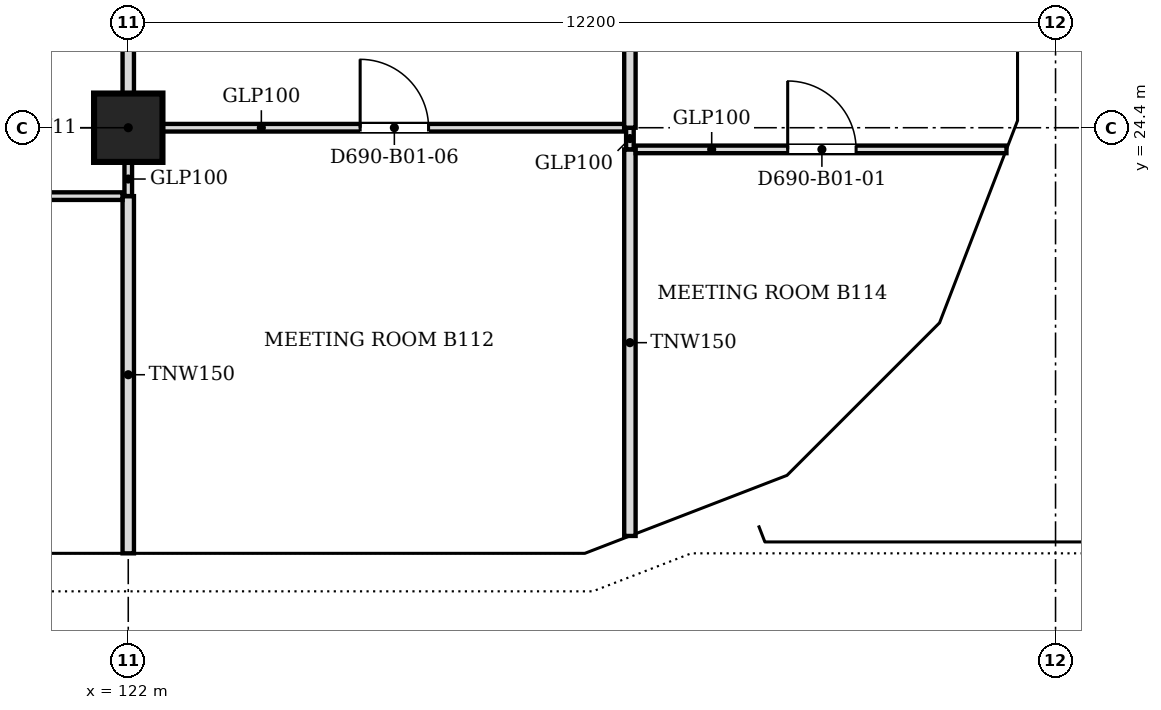
"""IFC4 building model, lengths in metres.
Left out: names, types, materials, properties, quantities, classifications, styles, units other than length and angle.
Written with IfcOpenShell. Run it as: python <this file> out.ifc"""

import sys

from ifc_helpers import new_model, si_unit, direction, frame, frame_2d, origin, origin_2d, place, context, subcontext, project, spatial, polyline, rectangle, outline, extrude, faceted_brep, source, transform, mapped, element, fill, save


model = new_model("IFC4")
c1 = context("Model", 3, precision=1e-05, world=origin(), true_north=direction((0.0, 1.0)))
c2 = subcontext(c1, "Body", "Model", "MODEL_VIEW")
j1 = project(units=[si_unit("LENGTHUNIT", "METRE"), si_unit("PLANEANGLEUNIT", "RADIAN")], contexts=[c1])
p1 = place(None, origin())
s1 = spatial("IfcSite", under=j1, at=p1, CompositionType="ELEMENT")
p2 = place(p1, origin())
s2 = spatial("IfcBuilding", under=s1, at=p2, CompositionType="ELEMENT")
p3 = place(p2, frame((0.0, 0.0, 16.8)))
s3 = spatial("IfcBuildingStorey", under=s2, at=p3, CompositionType="ELEMENT", Elevation=16.8)
p4 = place(p3, frame((122.0, 24.4, 0.0), z_axis=(0.0, 0.0, 1.0), x_axis=(1.0, 0.0, 0.0)))
e1 = element("IfcColumn", 1, at=p4, inside=s3, PredefinedType="COLUMN", context=c2, shape_type="SweptSolid", body=[
    extrude(rectangle(XDim=0.9, YDim=0.9, at=origin_2d()), origin(), (0.0, 0.0, 1.0), 4.3),
])
m1 = source(origin(), c2, "Body", "SweptSolid", [
    extrude(outline(polyline([(6.1, 0.0), (3.05, 4.5), (0.0, 0.0), (6.1, 0.0)])), frame((0.0, 0.25, 0.0), z_axis=(0.0, -1.0, 0.0), x_axis=(1.0, 0.0, 0.0)), (0.0, 0.0, 1.0), 0.5),
])
p5 = place(p3, frame((118.95, 18.55, 0.0), z_axis=(0.0, 0.0, 1.0), x_axis=(1.0, 0.0, 0.0)))
e2 = element("IfcWall", 2, at=p5, inside=s3, PredefinedType="SOLIDWALL", context=c2, shape_type="MappedRepresentation", body=[
    mapped(m1, transform((0.0, 0.0, 0.0), scale=1.0)),
])
m2 = source(origin(), c2, "Body", "SweptSolid", [
    extrude(outline(polyline([(5.629, 0.25), (3.05, 4.054), (0.471, 0.25), (5.629, 0.25)])), frame((0.0, 0.26, 0.0), z_axis=(0.0, -1.0, 0.0), x_axis=(1.0, 0.0, 0.0)), (0.0, 0.0, 1.0), 0.52),
])
p6 = place(p5, origin())
e3 = element("IfcOpeningElement", 3, at=p6, cuts=e2, PredefinedType="OPENING", context=c2, shape_type="MappedRepresentation", body=[
    mapped(m2, transform((0.0, 0.0, 0.0), scale=1.0)),
])
m3 = source(origin(), c2, "Body", "Brep", [
    faceted_brep([(3.05, -0.25, 4.429), (3.003, -0.25, 4.5), (0.0, -0.25, 0.0), (3.05, -0.25, 0.0), (0.0, 0.25, 0.0), (2.957, 0.25, 4.43), (2.957, 0.25, 0.0), (3.003, 0.0, 4.5)], [[[0, 1, 2, 3]], [[4, 5, 6]], [[7, 1, 0]], [[5, 4, 2, 1, 7]], [[4, 6, 3, 2]], [[3, 6, 5, 7, 0]]]),
])
p7 = place(p3, frame((125.05, 18.55, 0.0), z_axis=(0.0, 0.0, 1.0), x_axis=(1.0, 0.0, 0.0)))
e4 = element("IfcWall", 4, at=p7, inside=s3, PredefinedType="SOLIDWALL", context=c2, shape_type="MappedRepresentation", body=[
    mapped(m3, transform((0.0, 0.0, 0.0), scale=1.0)),
])
m4 = source(origin(), c2, "Body", "SweptSolid", [
    extrude(outline(polyline([(2.803, 3.75), (0.468, 0.25), (2.803, 0.25), (2.803, 3.75)])), frame((0.0, 0.26, 0.0), z_axis=(0.0, -1.0, 0.0), x_axis=(1.0, 0.0, 0.0)), (0.0, 0.0, 1.0), 0.52),
])
p8 = place(p7, origin())
e5 = element("IfcOpeningElement", 5, at=p8, cuts=e4, PredefinedType="OPENING", context=c2, shape_type="MappedRepresentation", body=[
    mapped(m4, transform((0.0, 0.0, 0.0), scale=1.0)),
])
m5 = source(origin(), c2, "Body", "Brep", [
    faceted_brep([(2.997, -0.25, 0.0), (0.047, -0.25, 4.5), (0.0, -0.25, 4.43), (0.0, -0.25, 0.0), (0.093, 0.25, 4.429), (2.944, 0.25, 0.081), (2.944, 0.25, 0.0), (0.093, 0.25, 0.0), (0.047, 0.0, 4.5), (2.997, 0.0, 0.0)], [[[0, 1, 2, 3]], [[4, 5, 6, 7]], [[5, 4, 8, 1, 0, 9]], [[2, 1, 8]], [[7, 6, 9, 0, 3]], [[7, 3, 2, 8, 4]], [[9, 6, 5]]]),
])
p9 = place(p3, frame((128.01, 18.533, 0.0), z_axis=(0.0, 0.0, 1.0), x_axis=(0.932990326376, 0.359901446078, 0.0)))
e6 = element("IfcWall", 6, at=p9, inside=s3, PredefinedType="SOLIDWALL", context=c2, shape_type="MappedRepresentation", body=[
    mapped(m5, transform((0.0, 0.0, 0.0), scale=1.0)),
])
m6 = source(origin(), c2, "Body", "SweptSolid", [
    extrude(outline(polyline([(2.534, 0.25), (0.247, 3.739), (0.247, 0.25), (2.534, 0.25)])), frame((0.0, 0.26, 0.0), z_axis=(0.0, -1.0, 0.0), x_axis=(1.0, 0.0, 0.0)), (0.0, 0.0, 1.0), 0.52),
])
p10 = place(p9, origin())
e7 = element("IfcOpeningElement", 7, at=p10, cuts=e6, PredefinedType="OPENING", context=c2, shape_type="MappedRepresentation", body=[
    mapped(m6, transform((0.0, 0.0, 0.0), scale=1.0)),
])
m7 = source(origin(), c2, "Body", "Brep", [
    faceted_brep([(2.997, -0.25, 4.419), (2.944, -0.25, 4.5), (0.0, -0.25, 0.0), (2.997, -0.25, 0.0), (0.053, 0.25, 0.081), (2.891, 0.25, 4.419), (2.891, 0.25, 0.0), (0.053, 0.25, 0.0), (2.944, 0.0, 4.5), (0.0, 0.0, 0.0)], [[[0, 1, 2, 3]], [[4, 5, 6, 7]], [[8, 1, 0]], [[5, 4, 9, 2, 1, 8]], [[7, 6, 3, 2, 9]], [[7, 9, 4]], [[3, 6, 5, 8, 0]]]),
])
p11 = place(p3, frame((130.806, 19.612, 0.0), z_axis=(0.0, 0.0, 1.0), x_axis=(0.707106781187, 0.707106781187, 0.0)))
e8 = element("IfcWall", 8, at=p11, inside=s3, PredefinedType="SOLIDWALL", context=c2, shape_type="MappedRepresentation", body=[
    mapped(m7, transform((0.0, 0.0, 0.0), scale=1.0)),
])
m8 = source(origin(), c2, "Body", "SweptSolid", [
    extrude(outline(polyline([(2.744, 3.738), (0.462, 0.25), (2.744, 0.25), (2.744, 3.738)])), frame((0.0, 0.26, 0.0), z_axis=(0.0, -1.0, 0.0), x_axis=(1.0, 0.0, 0.0)), (0.0, 0.0, 1.0), 0.52),
])
p12 = place(p11, origin())
e9 = element("IfcOpeningElement", 9, at=p12, cuts=e8, PredefinedType="OPENING", context=c2, shape_type="MappedRepresentation", body=[
    mapped(m8, transform((0.0, 0.0, 0.0), scale=1.0)),
])
m9 = source(origin(), c2, "Body", "Brep", [
    faceted_brep([(3.003, -0.25, 0.0), (0.053, -0.25, 4.5), (0.0, -0.25, 4.419), (0.0, -0.25, 0.0), (0.106, 0.25, 4.419), (2.957, 0.25, 0.071), (2.957, 0.25, 0.0), (0.106, 0.25, 0.0), (0.053, 0.0, 4.5), (3.003, 0.0, 0.0)], [[[0, 1, 2, 3]], [[4, 5, 6, 7]], [[5, 4, 8, 1, 0, 9]], [[2, 1, 8]], [[7, 6, 9, 0, 3]], [[7, 3, 2, 8, 4]], [[9, 6, 5]]]),
])
p13 = place(p3, frame((132.869, 21.644, 0.0), z_axis=(0.0, 0.0, 1.0), x_axis=(0.359855894603, 0.933007896601, 0.0)))
e10 = element("IfcWall", 10, at=p13, inside=s3, PredefinedType="SOLIDWALL", context=c2, shape_type="MappedRepresentation", body=[
    mapped(m9, transform((0.0, 0.0, 0.0), scale=1.0)),
])
m10 = source(origin(), c2, "Body", "SweptSolid", [
    extrude(outline(polyline([(2.541, 0.25), (0.253, 3.739), (0.253, 0.25), (2.541, 0.25)])), frame((0.0, 0.26, 0.0), z_axis=(0.0, -1.0, 0.0), x_axis=(1.0, 0.0, 0.0)), (0.0, 0.0, 1.0), 0.52),
])
p14 = place(p13, origin())
e11 = element("IfcOpeningElement", 11, at=p14, cuts=e10, PredefinedType="OPENING", context=c2, shape_type="MappedRepresentation", body=[
    mapped(m10, transform((0.0, 0.0, 0.0), scale=1.0)),
])
m11 = source(origin(), c2, "Body", "Brep", [
    faceted_brep([(6.053, -0.25, 0.0), (3.003, -0.25, 4.5), (0.0, -0.25, 0.0), (0.047, 0.25, 0.07), (3.003, 0.25, 4.5), (6.053, 0.25, 0.0), (0.047, 0.25, 0.0), (0.0, 0.0, 0.0)], [[[0, 1, 2]], [[3, 4, 5, 6]], [[5, 4, 1, 0]], [[4, 3, 7, 2, 1]], [[6, 5, 0, 2, 7]], [[6, 7, 3]]]),
])
p15 = place(p3, frame((133.95, 24.447, 0.0), z_axis=(0.0, 0.0, 1.0), x_axis=(0.0, 1.0, 0.0)))
e12 = element("IfcWall", 12, at=p15, inside=s3, PredefinedType="SOLIDWALL", context=c2, shape_type="MappedRepresentation", body=[
    mapped(m11, transform((0.0, 0.0, 0.0), scale=1.0)),
])
m12 = source(origin(), c2, "Body", "SweptSolid", [
    extrude(outline(polyline([(5.582, 0.25), (3.005, 4.052), (0.468, 0.25), (5.582, 0.25)])), frame((0.0, 0.26, 0.0), z_axis=(0.0, -1.0, 0.0), x_axis=(1.0, 0.0, 0.0)), (0.0, 0.0, 1.0), 0.52),
])
p16 = place(p15, origin())
e13 = element("IfcOpeningElement", 13, at=p16, cuts=e12, PredefinedType="OPENING", context=c2, shape_type="MappedRepresentation", body=[
    mapped(m12, transform((0.0, 0.0, 0.0), scale=1.0)),
])
p17 = place(p2, frame((0.0, 0.0, 21.3)))
s4 = spatial("IfcBuildingStorey", under=s2, at=p17, CompositionType="ELEMENT", Elevation=21.3)
m13 = source(origin(), c2, "Body", "SweptSolid", [
    extrude(outline(polyline([(3.05, 0.0), (6.1, 4.5), (3.05, 9.0), (0.0, 4.5), (3.05, 0.0)])), frame((0.0, 0.25, 0.0), z_axis=(0.0, -1.0, 0.0), x_axis=(1.0, 0.0, 0.0)), (0.0, 0.0, 1.0), 0.5),
])
p18 = place(p17, frame((115.9, 18.55, -4.5), z_axis=(0.0, 0.0, 1.0), x_axis=(1.0, 0.0, 0.0)))
e14 = element("IfcWall", 14, at=p18, inside=s4, PredefinedType="SOLIDWALL", context=c2, shape_type="MappedRepresentation", body=[
    mapped(m13, transform((0.0, 0.0, 0.0), scale=1.0)),
])
m14 = source(origin(), c2, "Body", "SweptSolid", [
    extrude(outline(polyline([(3.05, 0.446), (5.798, 4.5), (3.05, 8.554), (0.302, 4.5), (3.05, 0.446)])), frame((0.0, 0.26, 0.0), z_axis=(0.0, -1.0, 0.0), x_axis=(1.0, 0.0, 0.0)), (0.0, 0.0, 1.0), 0.52),
])
p19 = place(p18, origin())
e15 = element("IfcOpeningElement", 15, at=p19, cuts=e14, PredefinedType="OPENING", context=c2, shape_type="MappedRepresentation", body=[
    mapped(m14, transform((0.0, 0.0, 0.0), scale=1.0)),
])
m15 = source(origin(), c2, "Body", "Brep", [
    faceted_brep([(3.05, -0.25, 0.0), (6.053, -0.25, 4.5), (3.05, -0.25, 9.0), (0.0, -0.25, 4.5), (0.0, 0.25, 4.5), (3.05, 0.25, 9.0), (6.007, 0.25, 4.57), (6.007, 0.25, 4.43), (3.05, 0.25, 0.0), (6.053, 0.0, 4.5)], [[[0, 1, 2, 3]], [[4, 5, 6, 7, 8]], [[8, 7, 9, 1, 0]], [[6, 5, 2, 1, 9]], [[5, 4, 3, 2]], [[4, 8, 0, 3]], [[9, 7, 6]]]),
])
p20 = place(p17, frame((122.0, 18.55, -4.5), z_axis=(0.0, 0.0, 1.0), x_axis=(1.0, 0.0, 0.0)))
e16 = element("IfcWall", 16, at=p20, inside=s4, PredefinedType="SOLIDWALL", context=c2, shape_type="MappedRepresentation", body=[
    mapped(m15, transform((0.0, 0.0, 0.0), scale=1.0)),
])
m16 = source(origin(), c2, "Body", "SweptSolid", [
    extrude(outline(polyline([(3.048, 0.448), (5.753, 4.5), (3.048, 8.552), (0.302, 4.5), (3.048, 0.448)])), frame((0.0, 0.26, 0.0), z_axis=(0.0, -1.0, 0.0), x_axis=(1.0, 0.0, 0.0)), (0.0, 0.0, 1.0), 0.52),
])
p21 = place(p20, origin())
e17 = element("IfcOpeningElement", 17, at=p21, cuts=e16, PredefinedType="OPENING", context=c2, shape_type="MappedRepresentation", body=[
    mapped(m16, transform((0.0, 0.0, 0.0), scale=1.0)),
])
m17 = source(origin(), c2, "Body", "Brep", [
    faceted_brep([(2.95, -0.25, 0.0), (3.003, -0.25, 0.081), (3.003, -0.25, 8.919), (2.95, -0.25, 9.0), (0.0, -0.25, 4.5), (0.047, 0.25, 4.571), (2.898, 0.25, 8.919), (2.898, 0.25, 0.081), (0.047, 0.25, 4.429), (2.95, 0.0, 0.0), (2.95, 0.0, 9.0), (0.0, 0.0, 4.5)], [[[0, 1, 2, 3, 4]], [[5, 6, 7, 8]], [[1, 0, 9]], [[10, 3, 2]], [[6, 5, 11, 4, 3, 10]], [[8, 7, 9, 0, 4, 11]], [[8, 11, 5]], [[1, 9, 7, 6, 10, 2]]]),
])
p22 = place(p17, frame((128.053, 18.55, -4.5), z_axis=(0.0, 0.0, 1.0), x_axis=(0.933007896601, 0.359855894603, 0.0)))
e18 = element("IfcWall", 18, at=p22, inside=s4, PredefinedType="SOLIDWALL", context=c2, shape_type="MappedRepresentation", body=[
    mapped(m17, transform((0.0, 0.0, 0.0), scale=1.0)),
])
m18 = source(origin(), c2, "Body", "SweptSolid", [
    extrude(outline(polyline([(2.75, 8.239), (0.299, 4.5), (2.75, 0.761), (2.75, 8.239)])), frame((0.0, 0.26, 0.0), z_axis=(0.0, -1.0, 0.0), x_axis=(1.0, 0.0, 0.0)), (0.0, 0.0, 1.0), 0.52),
])
p23 = place(p22, origin())
e19 = element("IfcOpeningElement", 19, at=p23, cuts=e18, PredefinedType="OPENING", context=c2, shape_type="MappedRepresentation", body=[
    mapped(m18, transform((0.0, 0.0, 0.0), scale=1.0)),
])
m19 = source(origin(), c2, "Body", "Brep", [
    faceted_brep([(0.053, -0.25, 0.0), (2.997, -0.25, 4.5), (0.053, -0.25, 9.0), (0.0, -0.25, 8.919), (0.0, -0.25, 0.081), (0.106, 0.25, 8.919), (2.944, 0.25, 4.581), (2.944, 0.25, 4.419), (0.106, 0.25, 0.081), (2.997, 0.0, 4.5), (0.053, 0.0, 0.0), (0.053, 0.0, 9.0)], [[[0, 1, 2, 3, 4]], [[5, 6, 7, 8]], [[8, 7, 9, 1, 0, 10]], [[6, 5, 11, 2, 1, 9]], [[3, 2, 11]], [[10, 0, 4]], [[8, 10, 4, 3, 11, 5]], [[9, 7, 6]]]),
])
p24 = place(p17, frame((130.769, 19.574, -4.5), z_axis=(0.0, 0.0, 1.0), x_axis=(0.707106781187, 0.707106781187, 0.0)))
e20 = element("IfcWall", 20, at=p24, inside=s4, PredefinedType="SOLIDWALL", context=c2, shape_type="MappedRepresentation", body=[
    mapped(m19, transform((0.0, 0.0, 0.0), scale=1.0)),
])
m20 = source(origin(), c2, "Body", "SweptSolid", [
    extrude(outline(polyline([(0.253, 0.762), (2.698, 4.5), (0.253, 8.238), (0.253, 0.762)])), frame((0.0, 0.26, 0.0), z_axis=(0.0, -1.0, 0.0), x_axis=(1.0, 0.0, 0.0)), (0.0, 0.0, 1.0), 0.52),
])
p25 = place(p24, origin())
e21 = element("IfcOpeningElement", 21, at=p25, cuts=e20, PredefinedType="OPENING", context=c2, shape_type="MappedRepresentation", body=[
    mapped(m20, transform((0.0, 0.0, 0.0), scale=1.0)),
])
m21 = source(origin(), c2, "Body", "Brep", [
    faceted_brep([(2.95, -0.25, 0.0), (2.997, -0.25, 0.07), (2.997, -0.25, 8.93), (2.95, -0.25, 9.0), (0.0, -0.25, 4.5), (0.053, 0.25, 4.581), (2.904, 0.25, 8.929), (2.904, 0.25, 0.071), (0.053, 0.25, 4.419), (2.95, 0.0, 0.0), (2.95, 0.0, 9.0), (0.0, 0.0, 4.5)], [[[0, 1, 2, 3, 4]], [[5, 6, 7, 8]], [[1, 0, 9]], [[10, 3, 2]], [[6, 5, 11, 4, 3, 10]], [[8, 7, 9, 0, 4, 11]], [[8, 11, 5]], [[1, 9, 7, 6, 10, 2]]]),
])
p26 = place(p17, frame((132.888, 21.694, -4.5), z_axis=(0.0, 0.0, 1.0), x_axis=(0.359901446078, 0.932990326376, 0.0)))
e22 = element("IfcWall", 22, at=p26, inside=s4, PredefinedType="SOLIDWALL", context=c2, shape_type="MappedRepresentation", body=[
    mapped(m21, transform((0.0, 0.0, 0.0), scale=1.0)),
])
p27 = place(p26, origin())
e23 = element("IfcOpeningElement", 23, at=p27, cuts=e22, PredefinedType="OPENING", context=c2, shape_type="MappedRepresentation", body=[
    mapped(m18, transform((0.0, 0.0, 0.0), scale=1.0)),
])
m22 = source(origin(), c2, "Body", "Brep", [
    faceted_brep([(0.047, -0.25, 0.0), (3.05, -0.25, 4.5), (0.047, -0.25, 9.0), (0.0, -0.25, 8.929), (0.0, -0.25, 0.071), (0.093, 0.25, 8.93), (3.05, 0.25, 4.5), (0.093, 0.25, 0.07), (0.047, 0.0, 0.0), (0.047, 0.0, 9.0)], [[[0, 1, 2, 3, 4]], [[5, 6, 7]], [[7, 6, 1, 0, 8]], [[6, 5, 9, 2, 1]], [[3, 2, 9]], [[8, 0, 4]], [[7, 8, 4, 3, 9, 5]]]),
])
p28 = place(p17, frame((133.95, 24.4, -4.5), z_axis=(0.0, 0.0, 1.0), x_axis=(0.0, 1.0, 0.0)))
e24 = element("IfcWall", 24, at=p28, inside=s4, PredefinedType="SOLIDWALL", context=c2, shape_type="MappedRepresentation", body=[
    mapped(m22, transform((0.0, 0.0, 0.0), scale=1.0)),
])
m23 = source(origin(), c2, "Body", "SweptSolid", [
    extrude(outline(polyline([(0.247, 0.75), (2.75, 4.5), (0.247, 8.25), (0.247, 0.75)])), frame((0.0, 0.26, 0.0), z_axis=(0.0, -1.0, 0.0), x_axis=(1.0, 0.0, 0.0)), (0.0, 0.0, 1.0), 0.52),
])
p29 = place(p28, origin())
e25 = element("IfcOpeningElement", 25, at=p29, cuts=e24, PredefinedType="OPENING", context=c2, shape_type="MappedRepresentation", body=[
    mapped(m23, transform((0.0, 0.0, 0.0), scale=1.0)),
])
p30 = place(p3, frame((122.0, 18.8, 0.0), z_axis=(0.0, 0.0, 1.0), x_axis=(0.0, 1.0, 0.0)))
e26 = element("IfcWall", 26, at=p30, inside=s3, PredefinedType="PARTITIONING", context=c2, shape_type="SweptSolid", body=[
    extrude(rectangle(XDim=4.7, YDim=0.15, at=frame_2d((2.35, 0.0))), origin(), (0.0, 0.0, 1.0), 3.415),
])
p31 = place(p3, frame((128.6, 19.029, 0.0), z_axis=(0.0, 0.0, 1.0), x_axis=(0.0, 1.0, 0.0)))
e27 = element("IfcWall", 27, at=p31, inside=s3, PredefinedType="PARTITIONING", context=c2, shape_type="SweptSolid", body=[
    extrude(rectangle(XDim=5.086, YDim=0.15, at=frame_2d((2.543, 0.0))), origin(), (0.0, 0.0, 1.0), 3.415),
])
p32 = place(p3, frame((121.924, 23.5, 0.0), z_axis=(0.0, 0.0, 1.0), x_axis=(-1.0, 0.0, 0.0)))
e28 = element("IfcWall", 28, at=p32, inside=s3, PredefinedType="PARTITIONING", context=c2, shape_type="SweptSolid", body=[
    extrude(rectangle(XDim=12.048, YDim=0.1, at=frame_2d((6.024, 0.0))), origin(), (0.0, 0.0, 1.0), 3.415),
])
m24 = source(origin(), c2, "Body", "SweptSolid", [
    extrude(rectangle(XDim=0.9, YDim=2.1, at=frame_2d((0.45, 1.05))), frame((0.0, 0.06, 0.0), z_axis=(0.0, -1.0, 0.0), x_axis=(1.0, 0.0, 0.0)), (0.0, 0.0, 1.0), 0.12),
])
p33 = place(p32, frame((8.648, 0.0, 0.0)))
e29 = element("IfcOpeningElement", 29, at=p33, cuts=e28, PredefinedType="OPENING", context=c2, shape_type="MappedRepresentation", body=[
    mapped(m24, transform((0.0, 0.0, 0.0), scale=1.0)),
])
p34 = place(p32, frame((2.63, 0.0, 0.0)))
e30 = element("IfcOpeningElement", 30, at=p34, cuts=e28, PredefinedType="OPENING", context=c2, shape_type="MappedRepresentation", body=[
    mapped(m24, transform((0.0, 0.0, 0.0), scale=1.0)),
])
p35 = place(p3, frame((122.0, 23.501, 0.0), z_axis=(0.0, 0.0, 1.0), x_axis=(0.0, 1.0, 0.0)))
e31 = element("IfcWall", 31, at=p35, inside=s3, PredefinedType="PARTITIONING", context=c2, shape_type="SweptSolid", body=[
    extrude(rectangle(XDim=0.448, YDim=0.1, at=frame_2d((0.224, 0.0))), origin(), (0.0, 0.0, 1.0), 3.415),
])
p36 = place(p3, frame((133.554, 24.115, 0.0), z_axis=(0.0, 0.0, 1.0), x_axis=(-1.0, 0.0, 0.0)))
e32 = element("IfcWall", 32, at=p36, inside=s3, PredefinedType="PARTITIONING", context=c2, shape_type="SweptSolid", body=[
    extrude(rectangle(XDim=4.878, YDim=0.1, at=frame_2d((2.439, 0.0))), origin(), (0.0, 0.0, 1.0), 3.415),
])
p37 = place(p36, frame((1.978, 0.0, 0.0)))
e33 = element("IfcOpeningElement", 33, at=p37, cuts=e32, PredefinedType="OPENING", context=c2, shape_type="MappedRepresentation", body=[
    mapped(m24, transform((0.0, 0.0, 0.0), scale=1.0)),
])
p38 = place(p3, frame((128.6, 24.116, 0.0), z_axis=(0.0, 0.0, 1.0), x_axis=(0.0, 1.0, 0.0)))
e34 = element("IfcWall", 34, at=p38, inside=s3, PredefinedType="PARTITIONING", context=c2, shape_type="SweptSolid", body=[
    extrude(rectangle(XDim=0.283, YDim=0.1, at=frame_2d((0.142, 0.0))), origin(), (0.0, 0.0, 1.0), 3.415),
])
p39 = place(p3, frame((128.524, 24.4, 0.0), z_axis=(0.0, 0.0, 1.0), x_axis=(-1.0, 0.0, 0.0)))
e35 = element("IfcWall", 35, at=p39, inside=s3, PredefinedType="PARTITIONING", context=c2, shape_type="SweptSolid", body=[
    extrude(rectangle(XDim=6.073, YDim=0.1, at=frame_2d((3.037, 0.0))), origin(), (0.0, 0.0, 1.0), 3.415),
])
p40 = place(p39, frame((2.573, 0.0, 0.0)))
e36 = element("IfcOpeningElement", 36, at=p40, cuts=e35, PredefinedType="OPENING", context=c2, shape_type="MappedRepresentation", body=[
    mapped(m24, transform((0.0, 0.0, 0.0), scale=1.0)),
])
p41 = place(p3, frame((128.6, 24.4, 0.0), z_axis=(0.0, 0.0, 1.0), x_axis=(0.0, 1.0, 0.0)))
e37 = element("IfcWall", 37, at=p41, inside=s3, PredefinedType="PARTITIONING", context=c2, shape_type="SweptSolid", body=[
    extrude(rectangle(XDim=9.724, YDim=0.15, at=frame_2d((4.862, 0.0))), origin(), (0.0, 0.0, 1.0), 3.415),
])
p42 = place(p3, frame((122.0, 24.851, 0.0), z_axis=(0.0, 0.0, 1.0), x_axis=(0.0, 1.0, 0.0)))
e38 = element("IfcWall", 38, at=p42, inside=s3, PredefinedType="PARTITIONING", context=c2, shape_type="SweptSolid", body=[
    extrude(rectangle(XDim=9.273, YDim=0.15, at=frame_2d((4.636, 0.0))), origin(), (0.0, 0.0, 1.0), 3.415),
])
m25 = source(origin(), c2, "Body", "SweptSolid", [
    extrude(rectangle(XDim=0.9, YDim=2.1, at=frame_2d((0.45, 1.05))), frame((0.0, 0.025, 0.0), z_axis=(0.0, -1.0, 0.0), x_axis=(1.0, 0.0, 0.0)), (0.0, 0.0, 1.0), 0.05),
])
p43 = place(p37, origin())
e39 = element("IfcDoor", 39, at=p43, inside=s3, OperationType="SINGLE_SWING_RIGHT", PredefinedType="DOOR", context=c2, shape_type="MappedRepresentation", body=[
    mapped(m25, transform((0.0, 0.0, 0.0), scale=1.0)),
])
fill(e33, e39)
p44 = place(p40, origin())
e40 = element("IfcDoor", 40, at=p44, inside=s3, OperationType="SINGLE_SWING_RIGHT", PredefinedType="DOOR", context=c2, shape_type="MappedRepresentation", body=[
    mapped(m25, transform((0.0, 0.0, 0.0), scale=1.0)),
])
fill(e36, e40)
save(model, sys.argv[1])
